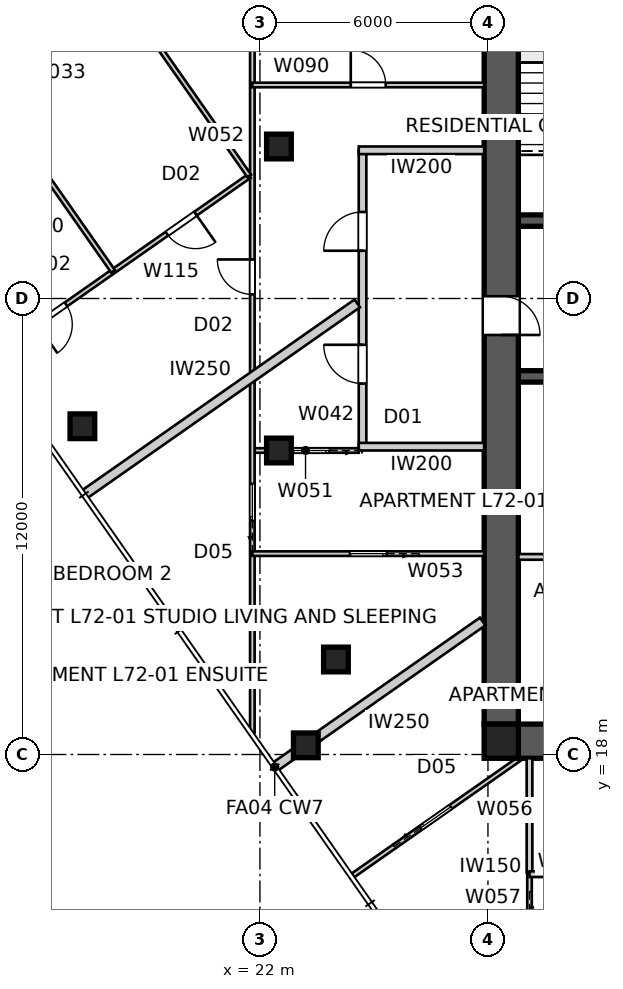
"""IFC4 building model, lengths in metres.
Left out: names, types, materials, properties, quantities, classifications, styles, units other than length and angle.
Written with IfcOpenShell. Run it as: python <this file> out.ifc"""

import sys

from ifc_helpers import new_model, si_unit, direction, frame, frame_2d, origin, origin_2d, place, context, subcontext, project, spatial, polyline, rectangle, outline, extrude, element, fill, save


model = new_model("IFC4")
c1 = context("Model", 3, precision=1e-05, world=origin(), true_north=direction((0.0, 1.0)))
c2 = subcontext(c1, "Body", "Model", "MODEL_VIEW")
j1 = project(units=[si_unit("LENGTHUNIT", "METRE"), si_unit("PLANEANGLEUNIT", "RADIAN")], contexts=[c1])
p1 = place(None, origin())
s1 = spatial("IfcSite", under=j1, at=p1, CompositionType="ELEMENT")
p2 = place(p1, origin())
s2 = spatial("IfcBuilding", under=s1, at=p2, CompositionType="ELEMENT")
p3 = place(p2, frame((0.0, 0.0, 260.8)))
s3 = spatial("IfcBuildingStorey", under=s2, at=p3, CompositionType="ELEMENT", Elevation=260.8)
p4 = place(p3, frame((51.2, 18.35, 0.0), z_axis=(0.0, 0.0, 1.0), x_axis=(-1.0, 0.0, 0.0)))
e1 = element("IfcWall", 1, at=p4, inside=s3, PredefinedType="SHEAR", context=c2, shape_type="SweptSolid", body=[
    extrude(outline(polyline([(0.0, -0.45), (22.4, -0.45), (22.4, -0.025), (22.85, -0.025), (22.85, 0.025), (22.4, 0.025), (22.4, 0.45), (0.0, 0.45), (0.0, 0.025), (-0.45, 0.025), (-0.45, -0.025), (0.0, -0.025), (0.0, -0.45)])), origin(), (0.0, 0.0, 1.0), 3.4),
])
p5 = place(p3, frame((28.35, 41.2, 0.0), z_axis=(0.0, 0.0, 1.0), x_axis=(0.0, -1.0, 0.0)))
e2 = element("IfcWall", 2, at=p5, inside=s3, PredefinedType="SHEAR", context=c2, shape_type="SweptSolid", body=[
    extrude(outline(polyline([(0.0, -0.45), (22.4, -0.45), (22.4, -0.025), (22.85, -0.025), (22.85, 0.025), (22.4, 0.025), (22.4, 0.45), (0.0, 0.45), (0.0, 0.025), (-0.45, 0.025), (-0.45, -0.025), (0.0, -0.025), (0.0, -0.45)])), origin(), (0.0, 0.0, 1.0), 3.4),
])
p6 = place(p5, frame((11.14, 0.0, 0.0)))
e3 = element("IfcOpeningElement", 3, at=p6, cuts=e2, PredefinedType="OPENING", context=c2, shape_type="SweptSolid", body=[
    extrude(rectangle(XDim=1.02, YDim=2.4, at=frame_2d((0.51, 1.2))), frame((0.0, 0.46, 0.0), z_axis=(0.0, -1.0, 0.0), x_axis=(1.0, 0.0, 0.0)), (0.0, 0.0, 1.0), 0.92),
])
p7 = place(p3, frame((28.8, 32.05, 0.0), z_axis=(0.0, 0.0, 1.0), x_axis=(1.0, 0.0, 0.0)))
e4 = element("IfcWall", 4, at=p7, inside=s3, PredefinedType="SHEAR", context=c2, shape_type="SweptSolid", body=[
    extrude(rectangle(XDim=22.4, YDim=0.3, at=frame_2d((11.2, 0.0))), origin(), (0.0, 0.0, 1.0), 3.4),
])
p8 = place(p7, frame((19.04, 0.0, 0.0)))
e5 = element("IfcOpeningElement", 5, at=p8, cuts=e4, PredefinedType="OPENING", context=c2, shape_type="SweptSolid", body=[
    extrude(rectangle(XDim=0.92, YDim=2.1, at=frame_2d((0.46, 1.05))), frame((0.0, 0.16, 0.0), z_axis=(0.0, -1.0, 0.0), x_axis=(1.0, 0.0, 0.0)), (0.0, 0.0, 1.0), 0.32),
])
p9 = place(p7, frame((1.265, 0.0, 0.0)))
e6 = element("IfcOpeningElement", 6, at=p9, cuts=e4, PredefinedType="OPENING", context=c2, shape_type="SweptSolid", body=[
    extrude(rectangle(XDim=1.02, YDim=2.1, at=frame_2d((0.51, 1.05))), frame((0.0, 0.16, 0.0), z_axis=(0.0, -1.0, 0.0), x_axis=(1.0, 0.0, 0.0)), (0.0, 0.0, 1.0), 0.32),
])
p10 = place(p7, frame((4.015, 0.0, 0.0)))
e7 = element("IfcOpeningElement", 7, at=p10, cuts=e4, PredefinedType="OPENING", context=c2, shape_type="SweptSolid", body=[
    extrude(rectangle(XDim=0.92, YDim=2.1, at=frame_2d((0.46, 1.05))), frame((0.0, 0.16, 0.0), z_axis=(0.0, -1.0, 0.0), x_axis=(1.0, 0.0, 0.0)), (0.0, 0.0, 1.0), 0.32),
])
p11 = place(p7, frame((6.565, 0.0, 0.0)))
e8 = element("IfcOpeningElement", 8, at=p11, cuts=e4, PredefinedType="OPENING", context=c2, shape_type="SweptSolid", body=[
    extrude(rectangle(XDim=0.92, YDim=2.1, at=frame_2d((0.46, 1.05))), frame((0.0, 0.16, 0.0), z_axis=(0.0, -1.0, 0.0), x_axis=(1.0, 0.0, 0.0)), (0.0, 0.0, 1.0), 0.32),
])
p12 = place(p7, frame((8.89, 0.0, 0.0)))
e9 = element("IfcOpeningElement", 9, at=p12, cuts=e4, PredefinedType="OPENING", context=c2, shape_type="SweptSolid", body=[
    extrude(rectangle(XDim=0.92, YDim=2.1, at=frame_2d((0.46, 1.05))), frame((0.0, 0.16, 0.0), z_axis=(0.0, -1.0, 0.0), x_axis=(1.0, 0.0, 0.0)), (0.0, 0.0, 1.0), 0.32),
])
p13 = place(p7, frame((12.05, 0.0, 0.0)))
e10 = element("IfcOpeningElement", 10, at=p13, cuts=e4, PredefinedType="OPENING", context=c2, shape_type="SweptSolid", body=[
    extrude(rectangle(XDim=1.1, YDim=2.1, at=frame_2d((0.55, 1.05))), frame((0.0, 0.16, 0.0), z_axis=(0.0, -1.0, 0.0), x_axis=(1.0, 0.0, 0.0)), (0.0, 0.0, 1.0), 0.32),
])
p14 = place(p7, frame((14.85, 0.0, 0.0)))
e11 = element("IfcOpeningElement", 11, at=p14, cuts=e4, PredefinedType="OPENING", context=c2, shape_type="SweptSolid", body=[
    extrude(rectangle(XDim=1.1, YDim=2.1, at=frame_2d((0.55, 1.05))), frame((0.0, 0.16, 0.0), z_axis=(0.0, -1.0, 0.0), x_axis=(1.0, 0.0, 0.0)), (0.0, 0.0, 1.0), 0.32),
])
p15 = place(p3, frame((51.2, 27.95, 0.0), z_axis=(0.0, 0.0, 1.0), x_axis=(-1.0, 0.0, 0.0)))
e12 = element("IfcWall", 12, at=p15, inside=s3, PredefinedType="SHEAR", context=c2, shape_type="SweptSolid", body=[
    extrude(rectangle(XDim=22.4, YDim=0.3, at=frame_2d((11.2, 0.0))), origin(), (0.0, 0.0, 1.0), 3.4),
])
p16 = place(p15, frame((19.04, 0.0, 0.0)))
e13 = element("IfcOpeningElement", 13, at=p16, cuts=e12, PredefinedType="OPENING", context=c2, shape_type="SweptSolid", body=[
    extrude(rectangle(XDim=0.92, YDim=2.1, at=frame_2d((0.46, 1.05))), frame((0.0, 0.16, 0.0), z_axis=(0.0, -1.0, 0.0), x_axis=(1.0, 0.0, 0.0)), (0.0, 0.0, 1.0), 0.32),
])
p17 = place(p15, frame((1.265, 0.0, 0.0)))
e14 = element("IfcOpeningElement", 14, at=p17, cuts=e12, PredefinedType="OPENING", context=c2, shape_type="SweptSolid", body=[
    extrude(rectangle(XDim=1.02, YDim=2.1, at=frame_2d((0.51, 1.05))), frame((0.0, 0.16, 0.0), z_axis=(0.0, -1.0, 0.0), x_axis=(1.0, 0.0, 0.0)), (0.0, 0.0, 1.0), 0.32),
])
p18 = place(p15, frame((4.015, 0.0, 0.0)))
e15 = element("IfcOpeningElement", 15, at=p18, cuts=e12, PredefinedType="OPENING", context=c2, shape_type="SweptSolid", body=[
    extrude(rectangle(XDim=0.92, YDim=2.1, at=frame_2d((0.46, 1.05))), frame((0.0, 0.16, 0.0), z_axis=(0.0, -1.0, 0.0), x_axis=(1.0, 0.0, 0.0)), (0.0, 0.0, 1.0), 0.32),
])
p19 = place(p15, frame((8.89, 0.0, 0.0)))
e16 = element("IfcOpeningElement", 16, at=p19, cuts=e12, PredefinedType="OPENING", context=c2, shape_type="SweptSolid", body=[
    extrude(rectangle(XDim=0.92, YDim=2.1, at=frame_2d((0.46, 1.05))), frame((0.0, 0.16, 0.0), z_axis=(0.0, -1.0, 0.0), x_axis=(1.0, 0.0, 0.0)), (0.0, 0.0, 1.0), 0.32),
])
p20 = place(p15, frame((6.565, 0.0, 0.0)))
e17 = element("IfcOpeningElement", 17, at=p20, cuts=e12, PredefinedType="OPENING", context=c2, shape_type="SweptSolid", body=[
    extrude(rectangle(XDim=0.92, YDim=2.1, at=frame_2d((0.46, 1.05))), frame((0.0, 0.16, 0.0), z_axis=(0.0, -1.0, 0.0), x_axis=(1.0, 0.0, 0.0)), (0.0, 0.0, 1.0), 0.32),
])
p21 = place(p15, frame((12.05, 0.0, 0.0)))
e18 = element("IfcOpeningElement", 18, at=p21, cuts=e12, PredefinedType="OPENING", context=c2, shape_type="SweptSolid", body=[
    extrude(rectangle(XDim=1.1, YDim=2.1, at=frame_2d((0.55, 1.05))), frame((0.0, 0.16, 0.0), z_axis=(0.0, -1.0, 0.0), x_axis=(1.0, 0.0, 0.0)), (0.0, 0.0, 1.0), 0.32),
])
p22 = place(p15, frame((14.85, 0.0, 0.0)))
e19 = element("IfcOpeningElement", 19, at=p22, cuts=e12, PredefinedType="OPENING", context=c2, shape_type="SweptSolid", body=[
    extrude(rectangle(XDim=1.1, YDim=2.1, at=frame_2d((0.55, 1.05))), frame((0.0, 0.16, 0.0), z_axis=(0.0, -1.0, 0.0), x_axis=(1.0, 0.0, 0.0)), (0.0, 0.0, 1.0), 0.32),
])
p23 = place(p3, frame((28.35, 18.35, 0.0), z_axis=(0.0, 0.0, 1.0), x_axis=(1.0, 0.0, 0.0)))
e20 = element("IfcColumn", 20, at=p23, inside=s3, PredefinedType="COLUMN", context=c2, shape_type="SweptSolid", body=[
    extrude(rectangle(XDim=0.9, YDim=0.9, at=origin_2d()), origin(), (0.0, 0.0, 1.0), 3.4),
])
for number, where, z_axis, x_axis in (
    (21, (17.328, 26.638, 0.0), (0.0, 0.0, 1.0), (1.0, 0.0, 0.0)),
    (22, (23.207, 18.242, 0.0), (0.0, 0.0, 1.0), (1.0, 0.0, 0.0)),
    (23, (22.5, 34.0, 0.0), (0.0, 0.0, 1.0), (1.0, 0.0, 0.0)),
    (24, (22.5, 26.0, 0.0), (0.0, 0.0, 1.0), (1.0, 0.0, 0.0)),
    (25, (24.0, 20.5, 0.0), (0.0, 0.0, 1.0), (1.0, 0.0, 0.0)),
):
    element("IfcColumn", number, at=place(p3, frame(where, z_axis=z_axis, x_axis=x_axis)), inside=s3, PredefinedType="COLUMN", context=c2, shape_type="SweptSolid", body=[
        extrude(rectangle(XDim=0.65, YDim=0.65, at=origin_2d()), origin(), (0.0, 0.0, 1.0), 3.4),
    ])
p24 = place(p3, frame((24.7, 26.1, 0.0), z_axis=(0.0, 0.0, 1.0), x_axis=(0.0, 1.0, 0.0)))
e26 = element("IfcWall", 26, at=p24, inside=s3, PredefinedType="PARTITIONING", context=c2, shape_type="SweptSolid", body=[
    extrude(rectangle(XDim=7.8, YDim=0.2, at=frame_2d((3.9, 0.0))), origin(), (0.0, 0.0, 1.0), 3.25),
])
p25 = place(p24, frame((1.662, 0.0, 0.0)))
e27 = element("IfcOpeningElement", 27, at=p25, cuts=e26, PredefinedType="OPENING", context=c2, shape_type="SweptSolid", body=[
    extrude(rectangle(XDim=1.02, YDim=2.34, at=frame_2d((0.51, 1.17))), frame((0.0, 0.11, 0.0), z_axis=(0.0, -1.0, 0.0), x_axis=(1.0, 0.0, 0.0)), (0.0, 0.0, 1.0), 0.22),
])
p26 = place(p24, frame((5.157, 0.0, 0.0)))
e28 = element("IfcOpeningElement", 28, at=p26, cuts=e26, PredefinedType="OPENING", context=c2, shape_type="SweptSolid", body=[
    extrude(rectangle(XDim=1.02, YDim=2.34, at=frame_2d((0.51, 1.17))), frame((0.0, 0.11, 0.0), z_axis=(0.0, -1.0, 0.0), x_axis=(1.0, 0.0, 0.0)), (0.0, 0.0, 1.0), 0.22),
])
for number, where, z_axis, x_axis in (
    (29, (27.9, 33.9, 0.0), (0.0, 0.0, 1.0), (-1.0, 0.0, 0.0)),
    (30, (27.9, 26.1, 0.0), (0.0, 0.0, 1.0), (-1.0, 0.0, 0.0)),
):
    element("IfcWall", number, at=place(p3, frame(where, z_axis=z_axis, x_axis=x_axis)), inside=s3, PredefinedType="PARTITIONING", context=c2, shape_type="SweptSolid", body=[
        extrude(rectangle(XDim=3.3, YDim=0.2, at=frame_2d((1.65, 0.0))), origin(), (0.0, 0.0, 1.0), 3.25),
    ])
p27 = place(p3, frame((22.388, 17.668, 0.0), z_axis=(0.0, 0.0, 1.0), x_axis=(0.819161528122, 0.573562891796, 0.0)))
e31 = element("IfcWall", 31, at=p27, inside=s3, PredefinedType="PARTITIONING", context=c2, shape_type="SweptSolid", body=[
    extrude(rectangle(XDim=6.681, YDim=0.25, at=frame_2d((3.341, 0.0))), origin(), (0.0, 0.0, 1.0), 3.25),
])
p28 = place(p3, frame((17.369, 24.836, 0.0), z_axis=(0.0, 0.0, 1.0), x_axis=(0.819152220062, 0.573576185321, 0.0)))
e32 = element("IfcWall", 32, at=p28, inside=s3, PredefinedType="PARTITIONING", context=c2, shape_type="SweptSolid", body=[
    extrude(rectangle(XDim=8.779, YDim=0.25, at=frame_2d((4.39, 0.0))), origin(), (0.0, 0.0, 1.0), 3.25),
])
p29 = place(p3, frame((37.0, 23.2, 0.0), z_axis=(0.0, 0.0, 1.0), x_axis=(-1.0, 0.0, 0.0)))
e33 = element("IfcWall", 33, at=p29, inside=s3, PredefinedType="SOLIDWALL", context=c2, shape_type="SweptSolid", body=[
    extrude(rectangle(XDim=8.2, YDim=0.15, at=frame_2d((4.1, 0.0))), origin(), (0.0, 0.0, 1.0), 3.25),
])
p30 = place(p29, frame((3.64, 0.0, 0.0)))
e34 = element("IfcOpeningElement", 34, at=p30, cuts=e33, PredefinedType="OPENING", context=c2, shape_type="SweptSolid", body=[
    extrude(rectangle(XDim=0.92, YDim=2.1, at=frame_2d((0.46, 1.05))), frame((0.0, 0.085, 0.0), z_axis=(0.0, -1.0, 0.0), x_axis=(1.0, 0.0, 0.0)), (0.0, 0.0, 1.0), 0.17),
])
p31 = place(p3, frame((24.6, 26.0, 0.0), z_axis=(0.0, 0.0, 1.0), x_axis=(-1.0, 0.0, 0.0)))
e35 = element("IfcWall", 35, at=p31, inside=s3, PredefinedType="PARTITIONING", context=c2, shape_type="SweptSolid", body=[
    extrude(rectangle(XDim=2.8, YDim=0.12, at=frame_2d((1.4, 0.0))), origin(), (0.0, 0.0, 1.0), 3.25),
])
p32 = place(p31, frame((0.77, 0.0, 0.0)))
e36 = element("IfcOpeningElement", 36, at=p32, cuts=e35, PredefinedType="OPENING", context=c2, shape_type="SweptSolid", body=[
    extrude(rectangle(XDim=0.96, YDim=2.1, at=frame_2d((0.48, 1.05))), frame((0.0, 0.07, 0.0), z_axis=(0.0, -1.0, 0.0), x_axis=(1.0, 0.0, 0.0)), (0.0, 0.0, 1.0), 0.14),
])
p33 = place(p3, frame((21.8, 18.578, 0.0), z_axis=(0.0, 0.0, 1.0), x_axis=(0.0, 1.0, 0.0)))
e37 = element("IfcWall", 37, at=p33, inside=s3, PredefinedType="PARTITIONING", context=c2, shape_type="SweptSolid", body=[
    extrude(rectangle(XDim=21.75, YDim=0.12, at=frame_2d((10.875, 0.0))), origin(), (0.0, 0.0, 1.0), 3.25),
])
p34 = place(p33, frame((11.53, 0.0, 0.0)))
e38 = element("IfcOpeningElement", 38, at=p34, cuts=e37, PredefinedType="OPENING", context=c2, shape_type="SweptSolid", body=[
    extrude(rectangle(XDim=0.92, YDim=2.34, at=frame_2d((0.46, 1.17))), frame((0.0, 0.07, 0.0), z_axis=(0.0, -1.0, 0.0), x_axis=(1.0, 0.0, 0.0)), (0.0, 0.0, 1.0), 0.14),
])
p35 = place(p33, frame((5.585, 0.0, 0.0)))
e39 = element("IfcOpeningElement", 39, at=p35, cuts=e37, PredefinedType="OPENING", context=c2, shape_type="SweptSolid", body=[
    extrude(rectangle(XDim=0.96, YDim=2.1, at=frame_2d((0.48, 1.05))), frame((0.0, 0.07, 0.0), z_axis=(0.0, -1.0, 0.0), x_axis=(1.0, 0.0, 0.0)), (0.0, 0.0, 1.0), 0.14),
])
p36 = place(p33, frame((18.936, 0.0, 0.0)))
e40 = element("IfcOpeningElement", 40, at=p36, cuts=e37, PredefinedType="OPENING", context=c2, shape_type="SweptSolid", body=[
    extrude(rectangle(XDim=0.92, YDim=2.34, at=frame_2d((0.46, 1.17))), frame((0.0, 0.07, 0.0), z_axis=(0.0, -1.0, 0.0), x_axis=(1.0, 0.0, 0.0)), (0.0, 0.0, 1.0), 0.14),
])
p37 = place(p3, frame((27.9, 23.286, 0.0), z_axis=(0.0, 0.0, 1.0), x_axis=(-1.0, 0.0, 0.0)))
e41 = element("IfcWall", 41, at=p37, inside=s3, PredefinedType="PARTITIONING", context=c2, shape_type="SweptSolid", body=[
    extrude(rectangle(XDim=6.1, YDim=0.12, at=frame_2d((3.05, 0.0))), origin(), (0.0, 0.0, 1.0), 3.25),
])
p38 = place(p37, frame((2.57, 0.0, 0.0)))
e42 = element("IfcOpeningElement", 42, at=p38, cuts=e41, PredefinedType="OPENING", context=c2, shape_type="SweptSolid", body=[
    extrude(rectangle(XDim=0.96, YDim=2.1, at=frame_2d((0.48, 1.05))), frame((0.0, 0.07, 0.0), z_axis=(0.0, -1.0, 0.0), x_axis=(1.0, 0.0, 0.0)), (0.0, 0.0, 1.0), 0.14),
])
p39 = place(p3, frame((24.437, 14.812, 0.0), z_axis=(0.0, 0.0, 1.0), x_axis=(0.819157353031, 0.573568854608, 0.0)))
e43 = element("IfcWall", 43, at=p39, inside=s3, PredefinedType="PARTITIONING", context=c2, shape_type="SweptSolid", body=[
    extrude(rectangle(XDim=5.384, YDim=0.12, at=frame_2d((2.692, 0.0))), origin(), (0.0, 0.0, 1.0), 3.25),
])
p40 = place(p39, frame((2.192, 0.0, 0.0)))
e44 = element("IfcOpeningElement", 44, at=p40, cuts=e43, PredefinedType="OPENING", context=c2, shape_type="SweptSolid", body=[
    extrude(rectangle(XDim=0.96, YDim=2.1, at=frame_2d((0.48, 1.05))), frame((0.0, 0.07, 0.0), z_axis=(0.0, -1.0, 0.0), x_axis=(1.0, 0.0, 0.0)), (0.0, 0.0, 1.0), 0.14),
])
p41 = place(p3, frame((29.094, 14.9, 0.0), z_axis=(0.0, 0.0, 1.0), x_axis=(0.0, -1.0, 0.0)))
e45 = element("IfcWall", 45, at=p41, inside=s3, PredefinedType="PARTITIONING", context=c2, shape_type="SweptSolid", body=[
    extrude(rectangle(XDim=3.1, YDim=0.12, at=frame_2d((1.55, 0.0))), origin(), (0.0, 0.0, 1.0), 3.25),
])
p42 = place(p41, frame((1.37, 0.0, 0.0)))
e46 = element("IfcOpeningElement", 46, at=p42, cuts=e45, PredefinedType="OPENING", context=c2, shape_type="SweptSolid", body=[
    extrude(rectangle(XDim=0.96, YDim=2.1, at=frame_2d((0.48, 1.05))), frame((0.0, 0.07, 0.0), z_axis=(0.0, -1.0, 0.0), x_axis=(1.0, 0.0, 0.0)), (0.0, 0.0, 1.0), 0.14),
])
p43 = place(p3, frame((29.094, 17.9, 0.0), z_axis=(0.0, 0.0, 1.0), x_axis=(0.0, -1.0, 0.0)))
e47 = element("IfcWall", 47, at=p43, inside=s3, PredefinedType="SOLIDWALL", context=c2, shape_type="SweptSolid", body=[
    extrude(rectangle(XDim=3.0, YDim=0.15, at=frame_2d((1.5, 0.0))), origin(), (0.0, 0.0, 1.0), 3.25),
])
p44 = place(p3, frame((29.094, 14.85, 0.0), z_axis=(0.0, 0.0, 1.0), x_axis=(1.0, 0.0, 0.0)))
e48 = element("IfcWall", 48, at=p44, inside=s3, PredefinedType="SOLIDWALL", context=c2, shape_type="SweptSolid", body=[
    extrude(rectangle(XDim=1.909, YDim=0.15, at=frame_2d((0.954, 0.0))), origin(), (0.0, 0.0, 1.0), 3.25),
])
p45 = place(p3, frame((21.8, 35.619, 0.0), z_axis=(0.0, 0.0, 1.0), x_axis=(1.0, 0.0, 0.0)))
e49 = element("IfcWall", 49, at=p45, inside=s3, PredefinedType="PARTITIONING", context=c2, shape_type="SweptSolid", body=[
    extrude(rectangle(XDim=6.1, YDim=0.12, at=frame_2d((3.05, 0.0))), origin(), (0.0, 0.0, 1.0), 3.25),
])
p46 = place(p45, frame((2.59, 0.0, 0.0)))
e50 = element("IfcOpeningElement", 50, at=p46, cuts=e49, PredefinedType="OPENING", context=c2, shape_type="SweptSolid", body=[
    extrude(rectangle(XDim=0.92, YDim=2.34, at=frame_2d((0.46, 1.17))), frame((0.0, 0.07, 0.0), z_axis=(0.0, -1.0, 0.0), x_axis=(1.0, 0.0, 0.0)), (0.0, 0.0, 1.0), 0.14),
])
p47 = place(p3, frame((21.72, 33.223, 0.0), z_axis=(0.0, 0.0, 1.0), x_axis=(-0.819152099525, -0.573576357466, 0.0)))
e51 = element("IfcWall", 51, at=p47, inside=s3, PredefinedType="PARTITIONING", context=c2, shape_type="SweptSolid", body=[
    extrude(rectangle(XDim=8.335, YDim=0.12, at=frame_2d((4.167, 0.0))), origin(), (0.0, 0.0, 1.0), 3.25),
])
p48 = place(p47, frame((1.728, 0.0, 0.0)))
e52 = element("IfcOpeningElement", 52, at=p48, cuts=e51, PredefinedType="OPENING", context=c2, shape_type="SweptSolid", body=[
    extrude(rectangle(XDim=0.92, YDim=2.34, at=frame_2d((0.46, 1.17))), frame((0.0, 0.07, 0.0), z_axis=(0.0, -1.0, 0.0), x_axis=(1.0, 0.0, 0.0)), (0.0, 0.0, 1.0), 0.14),
])
p49 = place(p47, frame((5.89, 0.0, 0.0)))
e53 = element("IfcOpeningElement", 53, at=p49, cuts=e51, PredefinedType="OPENING", context=c2, shape_type="SweptSolid", body=[
    extrude(rectangle(XDim=0.92, YDim=2.34, at=frame_2d((0.46, 1.17))), frame((0.0, 0.07, 0.0), z_axis=(0.0, -1.0, 0.0), x_axis=(1.0, 0.0, 0.0)), (0.0, 0.0, 1.0), 0.14),
])
p50 = place(p3, frame((16.94, 40.051, 0.0), z_axis=(0.0, 0.0, 1.0), x_axis=(0.573576357466, -0.819152099525, 0.0)))
e54 = element("IfcWall", 54, at=p50, inside=s3, PredefinedType="PARTITIONING", context=c2, shape_type="SweptSolid", body=[
    extrude(rectangle(XDim=8.335, YDim=0.12, at=frame_2d((4.167, 0.0))), origin(), (0.0, 0.0, 1.0), 3.25),
])
p51 = place(p3, frame((18.137, 30.714, 0.0), z_axis=(0.0, 0.0, 1.0), x_axis=(-0.573594626521, 0.819139307094, 0.0)))
e55 = element("IfcWall", 55, at=p51, inside=s3, PredefinedType="PARTITIONING", context=c2, shape_type="SweptSolid", body=[
    extrude(rectangle(XDim=4.335, YDim=0.12, at=frame_2d((2.167, 0.0))), origin(), (0.0, 0.0, 1.0), 3.25),
])
p52 = place(p25, origin())
e56 = element("IfcDoor", 56, at=p52, inside=s3, OperationType="SINGLE_SWING_RIGHT", PredefinedType="DOOR", context=c2, shape_type="SweptSolid", body=[
    extrude(rectangle(XDim=1.02, YDim=2.34, at=frame_2d((0.51, 1.17))), frame((0.0, 0.025, 0.0), z_axis=(0.0, -1.0, 0.0), x_axis=(1.0, 0.0, 0.0)), (0.0, 0.0, 1.0), 0.05),
])
fill(e27, e56)
p53 = place(p26, origin())
e57 = element("IfcDoor", 57, at=p53, inside=s3, OperationType="SINGLE_SWING_LEFT", PredefinedType="DOOR", context=c2, shape_type="SweptSolid", body=[
    extrude(rectangle(XDim=1.02, YDim=2.34, at=frame_2d((0.51, 1.17))), frame((0.0, 0.025, 0.0), z_axis=(0.0, -1.0, 0.0), x_axis=(1.0, 0.0, 0.0)), (0.0, 0.0, 1.0), 0.05),
])
fill(e28, e57)
p54 = place(p32, origin())
e58 = element("IfcDoor", 58, at=p54, inside=s3, OperationType="SLIDING_TO_LEFT", PredefinedType="DOOR", context=c2, shape_type="SweptSolid", body=[
    extrude(rectangle(XDim=0.96, YDim=2.1, at=frame_2d((0.48, 1.05))), frame((0.0, 0.025, 0.0), z_axis=(0.0, -1.0, 0.0), x_axis=(1.0, 0.0, 0.0)), (0.0, 0.0, 1.0), 0.05),
])
fill(e36, e58)
p55 = place(p46, origin())
e59 = element("IfcDoor", 59, at=p55, inside=s3, OperationType="SINGLE_SWING_LEFT", PredefinedType="DOOR", context=c2, shape_type="SweptSolid", body=[
    extrude(rectangle(XDim=0.92, YDim=2.34, at=frame_2d((0.46, 1.17))), frame((0.0, 0.025, 0.0), z_axis=(0.0, -1.0, 0.0), x_axis=(1.0, 0.0, 0.0)), (0.0, 0.0, 1.0), 0.05),
])
fill(e50, e59)
p56 = place(p34, origin())
e60 = element("IfcDoor", 60, at=p56, inside=s3, OperationType="SINGLE_SWING_RIGHT", PredefinedType="DOOR", context=c2, shape_type="SweptSolid", body=[
    extrude(rectangle(XDim=0.92, YDim=2.34, at=frame_2d((0.46, 1.17))), frame((0.0, 0.025, 0.0), z_axis=(0.0, -1.0, 0.0), x_axis=(1.0, 0.0, 0.0)), (0.0, 0.0, 1.0), 0.05),
])
fill(e38, e60)
p57 = place(p38, origin())
e61 = element("IfcDoor", 61, at=p57, inside=s3, OperationType="SLIDING_TO_LEFT", PredefinedType="DOOR", context=c2, shape_type="SweptSolid", body=[
    extrude(rectangle(XDim=0.96, YDim=2.1, at=frame_2d((0.48, 1.05))), frame((0.0, 0.025, 0.0), z_axis=(0.0, -1.0, 0.0), x_axis=(1.0, 0.0, 0.0)), (0.0, 0.0, 1.0), 0.05),
])
fill(e42, e61)
p58 = place(p35, origin())
e62 = element("IfcDoor", 62, at=p58, inside=s3, OperationType="SLIDING_TO_LEFT", PredefinedType="DOOR", context=c2, shape_type="SweptSolid", body=[
    extrude(rectangle(XDim=0.96, YDim=2.1, at=frame_2d((0.48, 1.05))), frame((0.0, 0.025, 0.0), z_axis=(0.0, -1.0, 0.0), x_axis=(1.0, 0.0, 0.0)), (0.0, 0.0, 1.0), 0.05),
])
fill(e39, e62)
p59 = place(p40, origin())
e63 = element("IfcDoor", 63, at=p59, inside=s3, OperationType="SLIDING_TO_LEFT", PredefinedType="DOOR", context=c2, shape_type="SweptSolid", body=[
    extrude(rectangle(XDim=0.96, YDim=2.1, at=frame_2d((0.48, 1.05))), frame((0.0, 0.025, 0.0), z_axis=(0.0, -1.0, 0.0), x_axis=(1.0, 0.0, 0.0)), (0.0, 0.0, 1.0), 0.05),
])
fill(e44, e63)
p60 = place(p48, origin())
e64 = element("IfcDoor", 64, at=p60, inside=s3, OperationType="SINGLE_SWING_LEFT", PredefinedType="DOOR", context=c2, shape_type="SweptSolid", body=[
    extrude(rectangle(XDim=0.92, YDim=2.34, at=frame_2d((0.46, 1.17))), frame((0.0, 0.025, 0.0), z_axis=(0.0, -1.0, 0.0), x_axis=(1.0, 0.0, 0.0)), (0.0, 0.0, 1.0), 0.05),
])
fill(e52, e64)
p61 = place(p49, origin())
e65 = element("IfcDoor", 65, at=p61, inside=s3, OperationType="SINGLE_SWING_RIGHT", PredefinedType="DOOR", context=c2, shape_type="SweptSolid", body=[
    extrude(rectangle(XDim=0.92, YDim=2.34, at=frame_2d((0.46, 1.17))), frame((0.0, 0.025, 0.0), z_axis=(0.0, -1.0, 0.0), x_axis=(1.0, 0.0, 0.0)), (0.0, 0.0, 1.0), 0.05),
])
fill(e53, e65)
p62 = place(p6, origin())
e66 = element("IfcDoor", 66, at=p62, inside=s3, OperationType="SINGLE_SWING_RIGHT", PredefinedType="DOOR", context=c2, shape_type="SweptSolid", body=[
    extrude(rectangle(XDim=1.02, YDim=2.4, at=frame_2d((0.51, 1.2))), frame((0.0, 0.025, 0.0), z_axis=(0.0, -1.0, 0.0), x_axis=(1.0, 0.0, 0.0)), (0.0, 0.0, 1.0), 0.05),
])
fill(e3, e66)
save(model, sys.argv[1])
